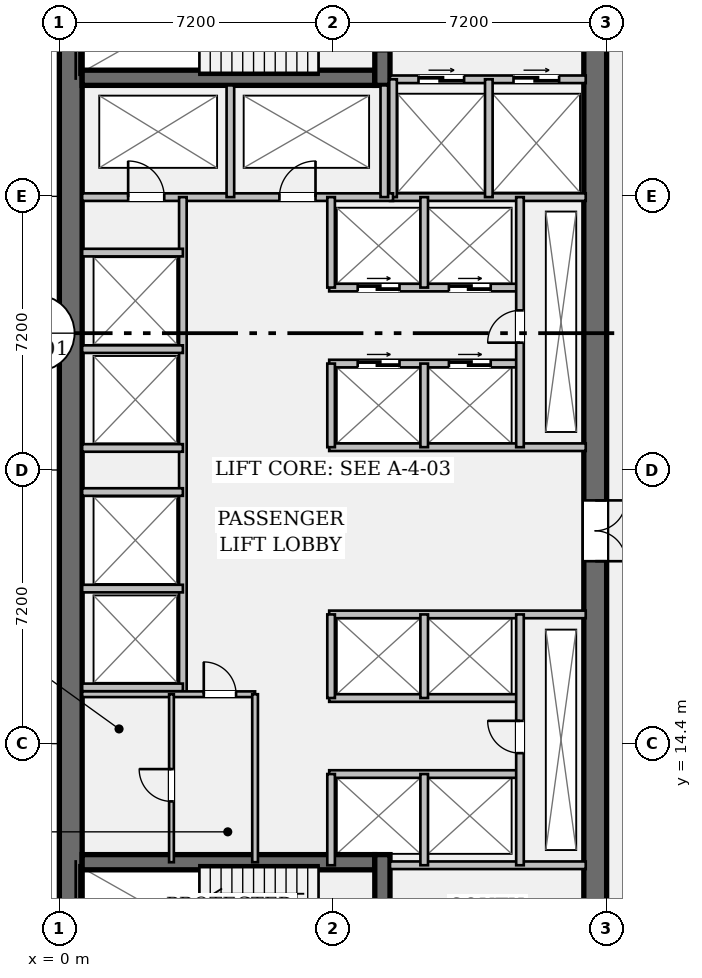
"""IFC4 building model, lengths in metres.
Left out: names, types, materials, properties, quantities, classifications, styles, units other than length and angle.
Written with IfcOpenShell. Run it as: python <this file> out.ifc"""

import sys

from ifc_helpers import new_model, si_unit, direction, frame, frame_2d, origin, place, context, subcontext, project, spatial, rectangle, extrude, element, fill, save


model = new_model("IFC4")
c1 = context("Model", 3, precision=1e-05, world=origin(), true_north=direction((0.0, 1.0)))
c2 = subcontext(c1, "Body", "Model", "MODEL_VIEW")
j1 = project(units=[si_unit("LENGTHUNIT", "METRE"), si_unit("PLANEANGLEUNIT", "RADIAN")], contexts=[c1])
p1 = place(None, origin())
s1 = spatial("IfcSite", under=j1, at=p1, CompositionType="ELEMENT")
p2 = place(p1, origin())
s2 = spatial("IfcBuilding", under=s1, at=p2, CompositionType="ELEMENT")
p3 = place(p2, frame((0.0, 0.0, 13.65)))
s3 = spatial("IfcBuildingStorey", under=s2, at=p3, CompositionType="ELEMENT", Elevation=13.65)
p4 = place(p3, frame((0.3, 7.2, 0.0), z_axis=(0.0, 0.0, 1.0), x_axis=(0.0, 1.0, 0.0)))
e1 = element("IfcWall", 1, at=p4, inside=s3, PredefinedType="SHEAR", context=c2, shape_type="SweptSolid", body=[
    extrude(rectangle(XDim=28.8, YDim=0.6, at=frame_2d((14.4, 0.0))), origin(), (0.0, 0.0, 1.0), 3.91),
])
p5 = place(p3, frame((14.1, 35.4, 0.0), z_axis=(0.0, 0.0, 1.0), x_axis=(0.0, -1.0, 0.0)))
e2 = element("IfcWall", 2, at=p5, inside=s3, PredefinedType="SHEAR", context=c2, shape_type="SweptSolid", body=[
    extrude(rectangle(XDim=27.6, YDim=0.6, at=frame_2d((13.8, 0.0))), origin(), (0.0, 0.0, 1.0), 3.91),
])
p6 = place(p5, frame((1.3, 0.0, 0.0)))
e3 = element("IfcOpeningElement", 3, at=p6, cuts=e2, PredefinedType="OPENING", context=c2, shape_type="SweptSolid", body=[
    extrude(rectangle(XDim=1.2, YDim=2.15, at=frame_2d((0.6, 1.075))), frame((0.0, 0.312, 0.0), z_axis=(0.0, -1.0, 0.0), x_axis=(1.0, 0.0, 0.0)), (0.0, 0.0, 1.0), 0.624),
])
p7 = place(p5, frame((25.25, 0.0, 0.0)))
e4 = element("IfcOpeningElement", 4, at=p7, cuts=e2, PredefinedType="OPENING", context=c2, shape_type="SweptSolid", body=[
    extrude(rectangle(XDim=1.2, YDim=2.15, at=frame_2d((0.6, 1.075))), frame((0.0, 0.312, 0.0), z_axis=(0.0, -1.0, 0.0), x_axis=(1.0, 0.0, 0.0)), (0.0, 0.0, 1.0), 0.624),
])
p8 = place(p5, frame((14.6, 0.0, 0.0)))
e5 = element("IfcOpeningElement", 5, at=p8, cuts=e2, PredefinedType="OPENING", context=c2, shape_type="SweptSolid", body=[
    extrude(rectangle(XDim=1.6, YDim=2.2, at=frame_2d((0.8, 1.1))), frame((0.0, 0.312, 0.0), z_axis=(0.0, -1.0, 0.0), x_axis=(1.0, 0.0, 0.0)), (0.0, 0.0, 1.0), 0.624),
])
for number, where, z_axis, x_axis in (
    (6, (0.6, 31.92, 0.0), (0.0, 0.0, 1.0), (1.0, 0.0, 0.0)),
    (7, (0.6, 11.28, 0.0), (0.0, 0.0, 1.0), (1.0, 0.0, 0.0)),
):
    element("IfcWall", number, at=place(p3, frame(where, z_axis=z_axis, x_axis=x_axis)), inside=s3, PredefinedType="SHEAR", context=c2, shape_type="SweptSolid", body=[
        extrude(rectangle(XDim=7.7, YDim=0.4, at=frame_2d((3.85, 0.0))), origin(), (0.0, 0.0, 1.0), 3.91),
    ])
p9 = place(p3, frame((8.5, 31.72, 0.0), z_axis=(0.0, 0.0, 1.0), x_axis=(0.0, 1.0, 0.0)))
e8 = element("IfcWall", 8, at=p9, inside=s3, PredefinedType="SHEAR", context=c2, shape_type="SweptSolid", body=[
    extrude(rectangle(XDim=3.68, YDim=0.4, at=frame_2d((1.84, 0.0))), origin(), (0.0, 0.0, 1.0), 3.91),
])
p10 = place(p9, frame((0.9, 0.0, 0.0)))
e9 = element("IfcOpeningElement", 9, at=p10, cuts=e8, PredefinedType="OPENING", context=c2, shape_type="SweptSolid", body=[
    extrude(rectangle(XDim=1.1, YDim=2.15, at=frame_2d((0.55, 1.075))), frame((0.0, 0.212, 0.0), z_axis=(0.0, -1.0, 0.0), x_axis=(1.0, 0.0, 0.0)), (0.0, 0.0, 1.0), 0.424),
])
p11 = place(p3, frame((8.5, 7.8, 0.0), z_axis=(0.0, 0.0, 1.0), x_axis=(0.0, 1.0, 0.0)))
e10 = element("IfcWall", 10, at=p11, inside=s3, PredefinedType="SHEAR", context=c2, shape_type="SweptSolid", body=[
    extrude(rectangle(XDim=3.68, YDim=0.4, at=frame_2d((1.84, 0.0))), origin(), (0.0, 0.0, 1.0), 3.91),
])
p12 = place(p11, frame((0.85, 0.0, 0.0)))
e11 = element("IfcOpeningElement", 11, at=p12, cuts=e10, PredefinedType="OPENING", context=c2, shape_type="SweptSolid", body=[
    extrude(rectangle(XDim=1.1, YDim=2.15, at=frame_2d((0.55, 1.075))), frame((0.0, 0.212, 0.0), z_axis=(0.0, -1.0, 0.0), x_axis=(1.0, 0.0, 0.0)), (0.0, 0.0, 1.0), 0.424),
])
p13 = place(p3, frame((8.7, 31.88, 0.0), z_axis=(0.0, 0.0, 1.0), x_axis=(1.0, 0.0, 0.0)))
e12 = element("IfcWall", 12, at=p13, inside=s3, PredefinedType="PARTITIONING", context=c2, shape_type="SweptSolid", body=[
    extrude(rectangle(XDim=5.15, YDim=0.2, at=frame_2d((2.575, 0.0))), origin(), (0.0, 0.0, 1.0), 3.91),
])
p14 = place(p13, frame((0.75, 0.0, 0.0)))
e13 = element("IfcOpeningElement", 13, at=p14, cuts=e12, PredefinedType="OPENING", context=c2, shape_type="SweptSolid", body=[
    extrude(rectangle(XDim=1.2, YDim=2.2, at=frame_2d((0.6, 1.1))), frame((0.0, 0.112, 0.0), z_axis=(0.0, -1.0, 0.0), x_axis=(1.0, 0.0, 0.0)), (0.0, 0.0, 1.0), 0.224),
])
p15 = place(p13, frame((3.25, 0.0, 0.0)))
e14 = element("IfcOpeningElement", 14, at=p15, cuts=e12, PredefinedType="OPENING", context=c2, shape_type="SweptSolid", body=[
    extrude(rectangle(XDim=1.2, YDim=2.2, at=frame_2d((0.6, 1.1))), frame((0.0, 0.112, 0.0), z_axis=(0.0, -1.0, 0.0), x_axis=(1.0, 0.0, 0.0)), (0.0, 0.0, 1.0), 0.224),
])
for number, where, z_axis, x_axis in (
    (15, (8.7, 11.2, 0.0), (0.0, 0.0, 1.0), (1.0, 0.0, 0.0)),
    (16, (8.7, 28.78, 0.0), (0.0, 0.0, 1.0), (1.0, 0.0, 0.0)),
):
    element("IfcWall", number, at=place(p3, frame(where, z_axis=z_axis, x_axis=x_axis)), inside=s3, PredefinedType="PARTITIONING", context=c2, shape_type="SweptSolid", body=[
        extrude(rectangle(XDim=5.15, YDim=0.2, at=frame_2d((2.575, 0.0))), origin(), (0.0, 0.0, 1.0), 3.91),
    ])
for number, where, z_axis, x_axis in (
    (17, (8.78, 28.78, 0.0), (0.0, 0.0, 1.0), (0.0, 1.0, 0.0)),
    (18, (11.3, 28.78, 0.0), (0.0, 0.0, 1.0), (0.0, 1.0, 0.0)),
):
    element("IfcWall", number, at=place(p3, frame(where, z_axis=z_axis, x_axis=x_axis)), inside=s3, PredefinedType="PARTITIONING", context=c2, shape_type="SweptSolid", body=[
        extrude(rectangle(XDim=3.1, YDim=0.2, at=frame_2d((1.55, 0.0))), origin(), (0.0, 0.0, 1.0), 3.91),
    ])
p16 = place(p3, frame((0.6, 28.78, 0.0), z_axis=(0.0, 0.0, 1.0), x_axis=(1.0, 0.0, 0.0)))
e19 = element("IfcWall", 19, at=p16, inside=s3, PredefinedType="PARTITIONING", context=c2, shape_type="SweptSolid", body=[
    extrude(rectangle(XDim=8.18, YDim=0.2, at=frame_2d((4.09, 0.0))), origin(), (0.0, 0.0, 1.0), 3.91),
])
p17 = place(p16, frame((1.21, 0.0, 0.0)))
e20 = element("IfcOpeningElement", 20, at=p17, cuts=e19, PredefinedType="OPENING", context=c2, shape_type="SweptSolid", body=[
    extrude(rectangle(XDim=0.95, YDim=2.15, at=frame_2d((0.475, 1.075))), frame((0.0, 0.112, 0.0), z_axis=(0.0, -1.0, 0.0), x_axis=(1.0, 0.0, 0.0)), (0.0, 0.0, 1.0), 0.224),
])
p18 = place(p16, frame((5.19, 0.0, 0.0)))
e21 = element("IfcOpeningElement", 21, at=p18, cuts=e19, PredefinedType="OPENING", context=c2, shape_type="SweptSolid", body=[
    extrude(rectangle(XDim=0.95, YDim=2.15, at=frame_2d((0.475, 1.075))), frame((0.0, 0.112, 0.0), z_axis=(0.0, -1.0, 0.0), x_axis=(1.0, 0.0, 0.0)), (0.0, 0.0, 1.0), 0.224),
])
for number, where, z_axis, x_axis in (
    (22, (4.5, 28.78, 0.0), (0.0, 0.0, 1.0), (0.0, 1.0, 0.0)),
    (23, (8.55, 28.78, 0.0), (0.0, 0.0, 1.0), (0.0, 1.0, 0.0)),
):
    element("IfcWall", number, at=place(p3, frame(where, z_axis=z_axis, x_axis=x_axis)), inside=s3, PredefinedType="PARTITIONING", context=c2, shape_type="SweptSolid", body=[
        extrude(rectangle(XDim=2.94, YDim=0.2, at=frame_2d((1.47, 0.0))), origin(), (0.0, 0.0, 1.0), 3.91),
    ])
p19 = place(p3, frame((3.25, 15.7, 0.0), z_axis=(0.0, 0.0, 1.0), x_axis=(0.0, 1.0, 0.0)))
e24 = element("IfcWall", 24, at=p19, inside=s3, PredefinedType="PARTITIONING", context=c2, shape_type="SweptSolid", body=[
    extrude(rectangle(XDim=13.08, YDim=0.2, at=frame_2d((6.54, 0.0))), origin(), (0.0, 0.0, 1.0), 3.91),
])
for number, where, z_axis, x_axis in (
    (25, (0.6, 15.88, 0.0), (0.0, 0.0, 1.0), (1.0, 0.0, 0.0)),
    (26, (0.6, 18.48, 0.0), (0.0, 0.0, 1.0), (1.0, 0.0, 0.0)),
    (27, (0.6, 22.18, 0.0), (0.0, 0.0, 1.0), (1.0, 0.0, 0.0)),
    (28, (0.6, 24.78, 0.0), (0.0, 0.0, 1.0), (1.0, 0.0, 0.0)),
    (29, (0.6, 21.02, 0.0), (0.0, 0.0, 1.0), (1.0, 0.0, 0.0)),
    (30, (0.6, 27.32, 0.0), (0.0, 0.0, 1.0), (1.0, 0.0, 0.0)),
):
    element("IfcWall", number, at=place(p3, frame(where, z_axis=z_axis, x_axis=x_axis)), inside=s3, PredefinedType="PARTITIONING", context=c2, shape_type="SweptSolid", body=[
        extrude(rectangle(XDim=2.65, YDim=0.2, at=frame_2d((1.325, 0.0))), origin(), (0.0, 0.0, 1.0), 3.91),
    ])
p20 = place(p3, frame((7.1, 22.2, 0.0), z_axis=(0.0, 0.0, 1.0), x_axis=(1.0, 0.0, 0.0)))
e31 = element("IfcWall", 31, at=p20, inside=s3, PredefinedType="PARTITIONING", context=c2, shape_type="SweptSolid", body=[
    extrude(rectangle(XDim=6.75, YDim=0.2, at=frame_2d((3.375, 0.0))), origin(), (0.0, 0.0, 1.0), 3.91),
])
p21 = place(p3, frame((7.1, 24.4, 0.0), z_axis=(0.0, 0.0, 1.0), x_axis=(1.0, 0.0, 0.0)))
e32 = element("IfcWall", 32, at=p21, inside=s3, PredefinedType="PARTITIONING", context=c2, shape_type="SweptSolid", body=[
    extrude(rectangle(XDim=5.02, YDim=0.2, at=frame_2d((2.51, 0.0))), origin(), (0.0, 0.0, 1.0), 3.91),
])
p22 = place(p21, frame((0.75, 0.0, 0.0)))
e33 = element("IfcOpeningElement", 33, at=p22, cuts=e32, PredefinedType="OPENING", context=c2, shape_type="SweptSolid", body=[
    extrude(rectangle(XDim=1.1, YDim=2.2, at=frame_2d((0.55, 1.1))), frame((0.0, 0.112, 0.0), z_axis=(0.0, -1.0, 0.0), x_axis=(1.0, 0.0, 0.0)), (0.0, 0.0, 1.0), 0.224),
])
p23 = place(p21, frame((3.15, 0.0, 0.0)))
e34 = element("IfcOpeningElement", 34, at=p23, cuts=e32, PredefinedType="OPENING", context=c2, shape_type="SweptSolid", body=[
    extrude(rectangle(XDim=1.1, YDim=2.2, at=frame_2d((0.55, 1.1))), frame((0.0, 0.112, 0.0), z_axis=(0.0, -1.0, 0.0), x_axis=(1.0, 0.0, 0.0)), (0.0, 0.0, 1.0), 0.224),
])
p24 = place(p3, frame((7.1, 26.4, 0.0), z_axis=(0.0, 0.0, 1.0), x_axis=(1.0, 0.0, 0.0)))
e35 = element("IfcWall", 35, at=p24, inside=s3, PredefinedType="PARTITIONING", context=c2, shape_type="SweptSolid", body=[
    extrude(rectangle(XDim=5.02, YDim=0.2, at=frame_2d((2.51, 0.0))), origin(), (0.0, 0.0, 1.0), 3.91),
])
p25 = place(p24, frame((0.75, 0.0, 0.0)))
e36 = element("IfcOpeningElement", 36, at=p25, cuts=e35, PredefinedType="OPENING", context=c2, shape_type="SweptSolid", body=[
    extrude(rectangle(XDim=1.1, YDim=2.2, at=frame_2d((0.55, 1.1))), frame((0.0, 0.112, 0.0), z_axis=(0.0, -1.0, 0.0), x_axis=(1.0, 0.0, 0.0)), (0.0, 0.0, 1.0), 0.224),
])
p26 = place(p24, frame((3.15, 0.0, 0.0)))
e37 = element("IfcOpeningElement", 37, at=p26, cuts=e35, PredefinedType="OPENING", context=c2, shape_type="SweptSolid", body=[
    extrude(rectangle(XDim=1.1, YDim=2.2, at=frame_2d((0.55, 1.1))), frame((0.0, 0.112, 0.0), z_axis=(0.0, -1.0, 0.0), x_axis=(1.0, 0.0, 0.0)), (0.0, 0.0, 1.0), 0.224),
])
p27 = place(p3, frame((7.15, 22.2, 0.0), z_axis=(0.0, 0.0, 1.0), x_axis=(0.0, 1.0, 0.0)))
e38 = element("IfcWall", 38, at=p27, inside=s3, PredefinedType="PARTITIONING", context=c2, shape_type="SweptSolid", body=[
    extrude(rectangle(XDim=2.2, YDim=0.2, at=frame_2d((1.1, 0.0))), origin(), (0.0, 0.0, 1.0), 3.91),
])
p28 = place(p3, frame((7.15, 26.4, 0.0), z_axis=(0.0, 0.0, 1.0), x_axis=(0.0, 1.0, 0.0)))
e39 = element("IfcWall", 39, at=p28, inside=s3, PredefinedType="PARTITIONING", context=c2, shape_type="SweptSolid", body=[
    extrude(rectangle(XDim=2.38, YDim=0.2, at=frame_2d((1.19, 0.0))), origin(), (0.0, 0.0, 1.0), 3.91),
])
p29 = place(p3, frame((9.6, 22.2, 0.0), z_axis=(0.0, 0.0, 1.0), x_axis=(0.0, 1.0, 0.0)))
e40 = element("IfcWall", 40, at=p29, inside=s3, PredefinedType="PARTITIONING", context=c2, shape_type="SweptSolid", body=[
    extrude(rectangle(XDim=2.2, YDim=0.2, at=frame_2d((1.1, 0.0))), origin(), (0.0, 0.0, 1.0), 3.91),
])
p30 = place(p3, frame((9.6, 26.4, 0.0), z_axis=(0.0, 0.0, 1.0), x_axis=(0.0, 1.0, 0.0)))
e41 = element("IfcWall", 41, at=p30, inside=s3, PredefinedType="PARTITIONING", context=c2, shape_type="SweptSolid", body=[
    extrude(rectangle(XDim=2.38, YDim=0.2, at=frame_2d((1.19, 0.0))), origin(), (0.0, 0.0, 1.0), 3.91),
])
p31 = place(p3, frame((12.12, 22.2, 0.0), z_axis=(0.0, 0.0, 1.0), x_axis=(0.0, 1.0, 0.0)))
e42 = element("IfcWall", 42, at=p31, inside=s3, PredefinedType="PARTITIONING", context=c2, shape_type="SweptSolid", body=[
    extrude(rectangle(XDim=6.58, YDim=0.2, at=frame_2d((3.29, 0.0))), origin(), (0.0, 0.0, 1.0), 3.91),
])
p32 = place(p31, frame((2.75, 0.0, 0.0)))
e43 = element("IfcOpeningElement", 43, at=p32, cuts=e42, PredefinedType="OPENING", context=c2, shape_type="SweptSolid", body=[
    extrude(rectangle(XDim=0.85, YDim=2.15, at=frame_2d((0.425, 1.075))), frame((0.0, 0.112, 0.0), z_axis=(0.0, -1.0, 0.0), x_axis=(1.0, 0.0, 0.0)), (0.0, 0.0, 1.0), 0.224),
])
p33 = place(p3, frame((7.1, 17.8, 0.0), z_axis=(0.0, 0.0, 1.0), x_axis=(1.0, 0.0, 0.0)))
e44 = element("IfcWall", 44, at=p33, inside=s3, PredefinedType="PARTITIONING", context=c2, shape_type="SweptSolid", body=[
    extrude(rectangle(XDim=6.75, YDim=0.2, at=frame_2d((3.375, 0.0))), origin(), (0.0, 0.0, 1.0), 3.91),
])
for number, where, z_axis, x_axis in (
    (45, (7.1, 15.6, 0.0), (0.0, 0.0, 1.0), (1.0, 0.0, 0.0)),
    (46, (7.1, 13.6, 0.0), (0.0, 0.0, 1.0), (1.0, 0.0, 0.0)),
):
    element("IfcWall", number, at=place(p3, frame(where, z_axis=z_axis, x_axis=x_axis)), inside=s3, PredefinedType="PARTITIONING", context=c2, shape_type="SweptSolid", body=[
        extrude(rectangle(XDim=5.02, YDim=0.2, at=frame_2d((2.51, 0.0))), origin(), (0.0, 0.0, 1.0), 3.91),
    ])
p34 = place(p3, frame((7.15, 15.6, 0.0), z_axis=(0.0, 0.0, 1.0), x_axis=(0.0, 1.0, 0.0)))
e47 = element("IfcWall", 47, at=p34, inside=s3, PredefinedType="PARTITIONING", context=c2, shape_type="SweptSolid", body=[
    extrude(rectangle(XDim=2.2, YDim=0.2, at=frame_2d((1.1, 0.0))), origin(), (0.0, 0.0, 1.0), 3.91),
])
p35 = place(p3, frame((7.15, 11.2, 0.0), z_axis=(0.0, 0.0, 1.0), x_axis=(0.0, 1.0, 0.0)))
e48 = element("IfcWall", 48, at=p35, inside=s3, PredefinedType="PARTITIONING", context=c2, shape_type="SweptSolid", body=[
    extrude(rectangle(XDim=2.4, YDim=0.2, at=frame_2d((1.2, 0.0))), origin(), (0.0, 0.0, 1.0), 3.91),
])
p36 = place(p3, frame((9.6, 15.6, 0.0), z_axis=(0.0, 0.0, 1.0), x_axis=(0.0, 1.0, 0.0)))
e49 = element("IfcWall", 49, at=p36, inside=s3, PredefinedType="PARTITIONING", context=c2, shape_type="SweptSolid", body=[
    extrude(rectangle(XDim=2.2, YDim=0.2, at=frame_2d((1.1, 0.0))), origin(), (0.0, 0.0, 1.0), 3.91),
])
p37 = place(p3, frame((9.6, 11.2, 0.0), z_axis=(0.0, 0.0, 1.0), x_axis=(0.0, 1.0, 0.0)))
e50 = element("IfcWall", 50, at=p37, inside=s3, PredefinedType="PARTITIONING", context=c2, shape_type="SweptSolid", body=[
    extrude(rectangle(XDim=2.4, YDim=0.2, at=frame_2d((1.2, 0.0))), origin(), (0.0, 0.0, 1.0), 3.91),
])
p38 = place(p3, frame((12.12, 11.2, 0.0), z_axis=(0.0, 0.0, 1.0), x_axis=(0.0, 1.0, 0.0)))
e51 = element("IfcWall", 51, at=p38, inside=s3, PredefinedType="PARTITIONING", context=c2, shape_type="SweptSolid", body=[
    extrude(rectangle(XDim=6.6, YDim=0.2, at=frame_2d((3.3, 0.0))), origin(), (0.0, 0.0, 1.0), 3.91),
])
p39 = place(p38, frame((2.95, 0.0, 0.0)))
e52 = element("IfcOpeningElement", 52, at=p39, cuts=e51, PredefinedType="OPENING", context=c2, shape_type="SweptSolid", body=[
    extrude(rectangle(XDim=0.85, YDim=2.15, at=frame_2d((0.425, 1.075))), frame((0.0, 0.112, 0.0), z_axis=(0.0, -1.0, 0.0), x_axis=(1.0, 0.0, 0.0)), (0.0, 0.0, 1.0), 0.224),
])
p40 = place(p3, frame((0.6, 15.7, 0.0), z_axis=(0.0, 0.0, 1.0), x_axis=(1.0, 0.0, 0.0)))
e53 = element("IfcWall", 53, at=p40, inside=s3, PredefinedType="PARTITIONING", context=c2, shape_type="SweptSolid", body=[
    extrude(rectangle(XDim=4.55, YDim=0.15, at=frame_2d((2.275, 0.0))), origin(), (0.0, 0.0, 1.0), 3.91),
])
p41 = place(p40, frame((3.2, 0.0, 0.0)))
e54 = element("IfcOpeningElement", 54, at=p41, cuts=e53, PredefinedType="OPENING", context=c2, shape_type="SweptSolid", body=[
    extrude(rectangle(XDim=0.85, YDim=2.15, at=frame_2d((0.425, 1.075))), frame((0.0, 0.087, 0.0), z_axis=(0.0, -1.0, 0.0), x_axis=(1.0, 0.0, 0.0)), (0.0, 0.0, 1.0), 0.174),
])
p42 = place(p3, frame((5.15, 11.28, 0.0), z_axis=(0.0, 0.0, 1.0), x_axis=(0.0, 1.0, 0.0)))
e55 = element("IfcWall", 55, at=p42, inside=s3, PredefinedType="PARTITIONING", context=c2, shape_type="SweptSolid", body=[
    extrude(rectangle(XDim=4.42, YDim=0.15, at=frame_2d((2.21, 0.0))), origin(), (0.0, 0.0, 1.0), 3.91),
])
p43 = place(p3, frame((2.95, 11.28, 0.0), z_axis=(0.0, 0.0, 1.0), x_axis=(0.0, 1.0, 0.0)))
e56 = element("IfcWall", 56, at=p43, inside=s3, PredefinedType="PARTITIONING", context=c2, shape_type="SweptSolid", body=[
    extrude(rectangle(XDim=4.42, YDim=0.125, at=frame_2d((2.21, 0.0))), origin(), (0.0, 0.0, 1.0), 3.91),
])
p44 = place(p43, frame((1.6, 0.0, 0.0)))
e57 = element("IfcOpeningElement", 57, at=p44, cuts=e56, PredefinedType="OPENING", context=c2, shape_type="SweptSolid", body=[
    extrude(rectangle(XDim=0.85, YDim=2.15, at=frame_2d((0.425, 1.075))), frame((0.0, 0.074, 0.0), z_axis=(0.0, -1.0, 0.0), x_axis=(1.0, 0.0, 0.0)), (0.0, 0.0, 1.0), 0.149),
])
p45 = place(p14, origin())
e58 = element("IfcDoor", 58, at=p45, inside=s3, OperationType="DOUBLE_DOOR_SLIDING", PredefinedType="DOOR", context=c2, shape_type="SweptSolid", body=[
    extrude(rectangle(XDim=1.2, YDim=2.2, at=frame_2d((0.6, 1.1))), frame((0.0, 0.025, 0.0), z_axis=(0.0, -1.0, 0.0), x_axis=(1.0, 0.0, 0.0)), (0.0, 0.0, 1.0), 0.05),
])
fill(e13, e58)
p46 = place(p15, origin())
e59 = element("IfcDoor", 59, at=p46, inside=s3, OperationType="DOUBLE_DOOR_SLIDING", PredefinedType="DOOR", context=c2, shape_type="SweptSolid", body=[
    extrude(rectangle(XDim=1.2, YDim=2.2, at=frame_2d((0.6, 1.1))), frame((0.0, 0.025, 0.0), z_axis=(0.0, -1.0, 0.0), x_axis=(1.0, 0.0, 0.0)), (0.0, 0.0, 1.0), 0.05),
])
fill(e14, e59)
p47 = place(p17, origin())
e60 = element("IfcDoor", 60, at=p47, inside=s3, OperationType="SINGLE_SWING_LEFT", PredefinedType="DOOR", context=c2, shape_type="SweptSolid", body=[
    extrude(rectangle(XDim=0.95, YDim=2.15, at=frame_2d((0.475, 1.075))), frame((0.0, 0.025, 0.0), z_axis=(0.0, -1.0, 0.0), x_axis=(1.0, 0.0, 0.0)), (0.0, 0.0, 1.0), 0.05),
])
fill(e20, e60)
p48 = place(p18, origin())
e61 = element("IfcDoor", 61, at=p48, inside=s3, OperationType="SINGLE_SWING_RIGHT", PredefinedType="DOOR", context=c2, shape_type="SweptSolid", body=[
    extrude(rectangle(XDim=0.95, YDim=2.15, at=frame_2d((0.475, 1.075))), frame((0.0, 0.025, 0.0), z_axis=(0.0, -1.0, 0.0), x_axis=(1.0, 0.0, 0.0)), (0.0, 0.0, 1.0), 0.05),
])
fill(e21, e61)
p49 = place(p8, origin())
e62 = element("IfcDoor", 62, at=p49, inside=s3, OperationType="DOUBLE_DOOR_SINGLE_SWING", PredefinedType="DOOR", context=c2, shape_type="SweptSolid", body=[
    extrude(rectangle(XDim=1.6, YDim=2.2, at=frame_2d((0.8, 1.1))), frame((0.0, 0.025, 0.0), z_axis=(0.0, -1.0, 0.0), x_axis=(1.0, 0.0, 0.0)), (0.0, 0.0, 1.0), 0.05),
])
fill(e5, e62)
p50 = place(p32, origin())
e63 = element("IfcDoor", 63, at=p50, inside=s3, OperationType="SINGLE_SWING_LEFT", PredefinedType="DOOR", context=c2, shape_type="SweptSolid", body=[
    extrude(rectangle(XDim=0.85, YDim=2.15, at=frame_2d((0.425, 1.075))), frame((0.0, 0.025, 0.0), z_axis=(0.0, -1.0, 0.0), x_axis=(1.0, 0.0, 0.0)), (0.0, 0.0, 1.0), 0.05),
])
fill(e43, e63)
p51 = place(p22, origin())
e64 = element("IfcDoor", 64, at=p51, inside=s3, OperationType="DOUBLE_DOOR_SLIDING", PredefinedType="DOOR", context=c2, shape_type="SweptSolid", body=[
    extrude(rectangle(XDim=1.1, YDim=2.2, at=frame_2d((0.55, 1.1))), frame((0.0, 0.025, 0.0), z_axis=(0.0, -1.0, 0.0), x_axis=(1.0, 0.0, 0.0)), (0.0, 0.0, 1.0), 0.05),
])
fill(e33, e64)
p52 = place(p23, origin())
e65 = element("IfcDoor", 65, at=p52, inside=s3, OperationType="DOUBLE_DOOR_SLIDING", PredefinedType="DOOR", context=c2, shape_type="SweptSolid", body=[
    extrude(rectangle(XDim=1.1, YDim=2.2, at=frame_2d((0.55, 1.1))), frame((0.0, 0.025, 0.0), z_axis=(0.0, -1.0, 0.0), x_axis=(1.0, 0.0, 0.0)), (0.0, 0.0, 1.0), 0.05),
])
fill(e34, e65)
p53 = place(p25, origin())
e66 = element("IfcDoor", 66, at=p53, inside=s3, OperationType="DOUBLE_DOOR_SLIDING", PredefinedType="DOOR", context=c2, shape_type="SweptSolid", body=[
    extrude(rectangle(XDim=1.1, YDim=2.2, at=frame_2d((0.55, 1.1))), frame((0.0, 0.025, 0.0), z_axis=(0.0, -1.0, 0.0), x_axis=(1.0, 0.0, 0.0)), (0.0, 0.0, 1.0), 0.05),
])
fill(e36, e66)
p54 = place(p26, origin())
e67 = element("IfcDoor", 67, at=p54, inside=s3, OperationType="DOUBLE_DOOR_SLIDING", PredefinedType="DOOR", context=c2, shape_type="SweptSolid", body=[
    extrude(rectangle(XDim=1.1, YDim=2.2, at=frame_2d((0.55, 1.1))), frame((0.0, 0.025, 0.0), z_axis=(0.0, -1.0, 0.0), x_axis=(1.0, 0.0, 0.0)), (0.0, 0.0, 1.0), 0.05),
])
fill(e37, e67)
p55 = place(p39, origin())
e68 = element("IfcDoor", 68, at=p55, inside=s3, OperationType="SINGLE_SWING_RIGHT", PredefinedType="DOOR", context=c2, shape_type="SweptSolid", body=[
    extrude(rectangle(XDim=0.85, YDim=2.15, at=frame_2d((0.425, 1.075))), frame((0.0, 0.025, 0.0), z_axis=(0.0, -1.0, 0.0), x_axis=(1.0, 0.0, 0.0)), (0.0, 0.0, 1.0), 0.05),
])
fill(e52, e68)
p56 = place(p41, origin())
e69 = element("IfcDoor", 69, at=p56, inside=s3, OperationType="SINGLE_SWING_LEFT", PredefinedType="DOOR", context=c2, shape_type="SweptSolid", body=[
    extrude(rectangle(XDim=0.85, YDim=2.15, at=frame_2d((0.425, 1.075))), frame((0.0, 0.025, 0.0), z_axis=(0.0, -1.0, 0.0), x_axis=(1.0, 0.0, 0.0)), (0.0, 0.0, 1.0), 0.05),
])
fill(e54, e69)
p57 = place(p44, origin())
e70 = element("IfcDoor", 70, at=p57, inside=s3, OperationType="SINGLE_SWING_RIGHT", PredefinedType="DOOR", context=c2, shape_type="SweptSolid", body=[
    extrude(rectangle(XDim=0.85, YDim=2.15, at=frame_2d((0.425, 1.075))), frame((0.0, 0.025, 0.0), z_axis=(0.0, -1.0, 0.0), x_axis=(1.0, 0.0, 0.0)), (0.0, 0.0, 1.0), 0.05),
])
fill(e57, e70)
save(model, sys.argv[1])
